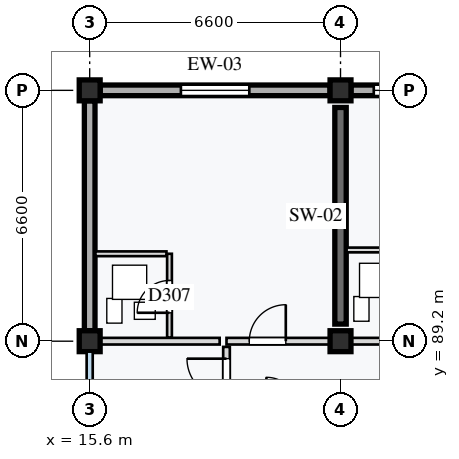
"""IFC4 building model, lengths in metres.
Left out: names, types, materials, properties, quantities, classifications, styles, units other than length and angle.
Written with IfcOpenShell. Run it as: python <this file> out.ifc"""

import sys

from ifc_helpers import new_model, si_unit, direction, frame, frame_2d, origin, origin_2d, place, context, subcontext, project, spatial, rectangle, extrude, element, fill, save


model = new_model("IFC4")
c1 = context("Model", 3, precision=1e-05, world=origin(), true_north=direction((0.0, 1.0)))
c2 = subcontext(c1, "Body", "Model", "MODEL_VIEW")
j1 = project(units=[si_unit("LENGTHUNIT", "METRE"), si_unit("PLANEANGLEUNIT", "RADIAN")], contexts=[c1])
p1 = place(None, origin())
s1 = spatial("IfcSite", under=j1, at=p1, CompositionType="ELEMENT")
p2 = place(p1, origin())
s2 = spatial("IfcBuilding", under=s1, at=p2, CompositionType="ELEMENT")
p3 = place(p2, frame((0.0, 0.0, 30.8)))
s3 = spatial("IfcBuildingStorey", under=s2, at=p3, CompositionType="ELEMENT", Elevation=30.8)
for number, where, z_axis, x_axis in (
    (1, (15.6, 89.2, 0.0), (0.0, 0.0, 1.0), (1.0, 0.0, 0.0)),
    (2, (15.6, 95.8, 0.0), (0.0, 0.0, 1.0), (1.0, 0.0, 0.0)),
    (3, (22.2, 89.2, 0.0), (0.0, 0.0, 1.0), (1.0, 0.0, 0.0)),
    (4, (22.2, 95.8, 0.0), (0.0, 0.0, 1.0), (1.0, 0.0, 0.0)),
):
    element("IfcColumn", number, at=place(p3, frame(where, z_axis=z_axis, x_axis=x_axis)), inside=s3, PredefinedType="COLUMN", context=c2, shape_type="SweptSolid", body=[
        extrude(rectangle(XDim=0.55, YDim=0.55, at=origin_2d()), origin(), (0.0, 0.0, 1.0), 3.2),
    ])
p4 = place(p3, frame((22.2, 89.65, 0.0), z_axis=(0.0, 0.0, 1.0), x_axis=(0.0, 1.0, 0.0)))
e5 = element("IfcWall", 5, at=p4, inside=s3, PredefinedType="SHEAR", context=c2, shape_type="SweptSolid", body=[
    extrude(rectangle(XDim=5.7, YDim=0.3, at=frame_2d((2.85, 0.0))), origin(), (0.0, 0.0, 1.0), 2.97),
])
p5 = place(p3, frame((15.875, 95.8, 0.0), z_axis=(0.0, 0.0, 1.0), x_axis=(1.0, 0.0, 0.0)))
e6 = element("IfcWall", 6, at=p5, inside=s3, PredefinedType="STANDARD", context=c2, shape_type="SweptSolid", body=[
    extrude(rectangle(XDim=6.05, YDim=0.28, at=frame_2d((3.025, 0.0))), origin(), (0.0, 0.0, 1.0), 2.6),
])
p6 = place(p5, frame((2.125, 0.0, 0.85)))
e7 = element("IfcOpeningElement", 7, at=p6, cuts=e6, PredefinedType="OPENING", context=c2, shape_type="SweptSolid", body=[
    extrude(rectangle(XDim=1.8, YDim=1.35, at=frame_2d((0.9, 0.675))), frame((0.0, 0.15, 0.0), z_axis=(0.0, -1.0, 0.0), x_axis=(1.0, 0.0, 0.0)), (0.0, 0.0, 1.0), 0.3),
])
p7 = place(p3, frame((22.475, 95.8, 0.0), z_axis=(0.0, 0.0, 1.0), x_axis=(1.0, 0.0, 0.0)))
e8 = element("IfcWall", 8, at=p7, inside=s3, PredefinedType="STANDARD", context=c2, shape_type="SweptSolid", body=[
    extrude(rectangle(XDim=6.05, YDim=0.28, at=frame_2d((3.025, 0.0))), origin(), (0.0, 0.0, 1.0), 2.6),
])
p8 = place(p7, frame((0.6, 0.0, 0.85)))
e9 = element("IfcOpeningElement", 9, at=p8, cuts=e8, PredefinedType="OPENING", context=c2, shape_type="SweptSolid", body=[
    extrude(rectangle(XDim=1.8, YDim=1.35, at=frame_2d((0.9, 0.675))), frame((0.0, 0.15, 0.0), z_axis=(0.0, -1.0, 0.0), x_axis=(1.0, 0.0, 0.0)), (0.0, 0.0, 1.0), 0.3),
])
p9 = place(p7, frame((4.025, 0.0, 0.85)))
e10 = element("IfcOpeningElement", 10, at=p9, cuts=e8, PredefinedType="OPENING", context=c2, shape_type="SweptSolid", body=[
    extrude(rectangle(XDim=1.5, YDim=1.35, at=frame_2d((0.75, 0.675))), frame((0.0, 0.15, 0.0), z_axis=(0.0, -1.0, 0.0), x_axis=(1.0, 0.0, 0.0)), (0.0, 0.0, 1.0), 0.3),
])
p10 = place(p3, frame((15.6, 89.475, 0.0), z_axis=(0.0, 0.0, 1.0), x_axis=(0.0, 1.0, 0.0)))
e11 = element("IfcWall", 11, at=p10, inside=s3, PredefinedType="STANDARD", context=c2, shape_type="SweptSolid", body=[
    extrude(rectangle(XDim=6.05, YDim=0.28, at=frame_2d((3.025, 0.0))), origin(), (0.0, 0.0, 1.0), 2.65),
])
p11 = place(p3, frame((19.2, 86.05, 0.0), z_axis=(0.0, 0.0, 1.0), x_axis=(0.0, 1.0, 0.0)))
e12 = element("IfcWall", 12, at=p11, inside=s3, PredefinedType="PARTITIONING", context=c2, shape_type="SweptSolid", body=[
    extrude(rectangle(XDim=3.0, YDim=0.175, at=frame_2d((1.5, 0.0))), origin(), (0.0, 0.0, 1.0), 2.97),
])
p12 = place(p11, frame((1.65, 0.0, 0.0)))
e13 = element("IfcOpeningElement", 13, at=p12, cuts=e12, PredefinedType="OPENING", context=c2, shape_type="SweptSolid", body=[
    extrude(rectangle(XDim=1.04, YDim=2.12, at=frame_2d((0.52, 1.06))), frame((0.0, 0.097, 0.0), z_axis=(0.0, -1.0, 0.0), x_axis=(1.0, 0.0, 0.0)), (0.0, 0.0, 1.0), 0.195),
])
p13 = place(p3, frame((15.88, 89.2, 0.0), z_axis=(0.0, 0.0, 1.0), x_axis=(1.0, 0.0, 0.0)))
e14 = element("IfcWall", 14, at=p13, inside=s3, PredefinedType="PARTITIONING", context=c2, shape_type="SweptSolid", body=[
    extrude(rectangle(XDim=3.14, YDim=0.175, at=frame_2d((1.57, 0.0))), origin(), (0.0, 0.0, 1.0), 2.55),
])
p14 = place(p3, frame((19.2, 89.2, 0.0), z_axis=(0.0, 0.0, 1.0), x_axis=(1.0, 0.0, 0.0)))
e15 = element("IfcWall", 15, at=p14, inside=s3, PredefinedType="PARTITIONING", context=c2, shape_type="SweptSolid", body=[
    extrude(rectangle(XDim=3.0, YDim=0.175, at=frame_2d((1.5, 0.0))), origin(), (0.0, 0.0, 1.0), 2.55),
])
p15 = place(p14, frame((0.6, 0.0, 0.0)))
e16 = element("IfcOpeningElement", 16, at=p15, cuts=e15, PredefinedType="OPENING", context=c2, shape_type="SweptSolid", body=[
    extrude(rectangle(XDim=0.96, YDim=2.18, at=frame_2d((0.48, 1.09))), frame((0.0, 0.097, 0.0), z_axis=(0.0, -1.0, 0.0), x_axis=(1.0, 0.0, 0.0)), (0.0, 0.0, 1.0), 0.195),
])
p16 = place(p3, frame((17.7, 89.298, 0.0), z_axis=(0.0, 0.0, 1.0), x_axis=(0.0, 1.0, 0.0)))
e17 = element("IfcWall", 17, at=p16, inside=s3, PredefinedType="PARTITIONING", context=c2, shape_type="SweptSolid", body=[
    extrude(rectangle(XDim=2.202, YDim=0.125, at=frame_2d((1.101, 0.0))), origin(), (0.0, 0.0, 1.0), 2.97),
])
p17 = place(p16, frame((0.65, 0.0, 0.0)))
e18 = element("IfcOpeningElement", 18, at=p17, cuts=e17, PredefinedType="OPENING", context=c2, shape_type="SweptSolid", body=[
    extrude(rectangle(XDim=0.85, YDim=2.04, at=frame_2d((0.425, 1.02))), frame((0.0, 0.073, 0.0), z_axis=(0.0, -1.0, 0.0), x_axis=(1.0, 0.0, 0.0)), (0.0, 0.0, 1.0), 0.145),
])
p18 = place(p3, frame((15.75, 91.5, 0.0), z_axis=(0.0, 0.0, 1.0), x_axis=(1.0, 0.0, 0.0)))
e19 = element("IfcWall", 19, at=p18, inside=s3, PredefinedType="PARTITIONING", context=c2, shape_type="SweptSolid", body=[
    extrude(rectangle(XDim=1.87, YDim=0.125, at=frame_2d((0.935, 0.0))), origin(), (0.0, 0.0, 1.0), 2.97),
])
p19 = place(p3, frame((22.2, 89.2, 0.0), z_axis=(0.0, 0.0, 1.0), x_axis=(1.0, 0.0, 0.0)))
e20 = element("IfcWall", 20, at=p19, inside=s3, PredefinedType="PARTITIONING", context=c2, shape_type="SweptSolid", body=[
    extrude(rectangle(XDim=6.6, YDim=0.175, at=frame_2d((3.3, 0.0))), origin(), (0.0, 0.0, 1.0), 2.55),
])
p20 = place(p19, frame((3.85, 0.0, 0.0)))
e21 = element("IfcOpeningElement", 21, at=p20, cuts=e20, PredefinedType="OPENING", context=c2, shape_type="SweptSolid", body=[
    extrude(rectangle(XDim=0.95, YDim=2.16, at=frame_2d((0.475, 1.08))), frame((0.0, 0.097, 0.0), z_axis=(0.0, -1.0, 0.0), x_axis=(1.0, 0.0, 0.0)), (0.0, 0.0, 1.0), 0.195),
])
p21 = place(p3, frame((22.36, 91.6, 0.0), z_axis=(0.0, 0.0, 1.0), x_axis=(1.0, 0.0, 0.0)))
e22 = element("IfcWall", 22, at=p21, inside=s3, PredefinedType="PARTITIONING", context=c2, shape_type="SweptSolid", body=[
    extrude(rectangle(XDim=1.66, YDim=0.125, at=frame_2d((0.83, 0.0))), origin(), (0.0, 0.0, 1.0), 2.97),
])
p22 = place(p6, origin())
e23 = element("IfcWindow", 23, at=p22, inside=s3, PartitioningType="SINGLE_PANEL", PredefinedType="WINDOW", context=c2, shape_type="SweptSolid", body=[
    extrude(rectangle(XDim=1.8, YDim=1.35, at=frame_2d((0.9, 0.675))), frame((0.0, 0.03, 0.0), z_axis=(0.0, -1.0, 0.0), x_axis=(1.0, 0.0, 0.0)), (0.0, 0.0, 1.0), 0.06),
])
fill(e7, e23)
p23 = place(p8, origin())
e24 = element("IfcWindow", 24, at=p23, inside=s3, PartitioningType="SINGLE_PANEL", PredefinedType="WINDOW", context=c2, shape_type="SweptSolid", body=[
    extrude(rectangle(XDim=1.8, YDim=1.35, at=frame_2d((0.9, 0.675))), frame((0.0, 0.03, 0.0), z_axis=(0.0, -1.0, 0.0), x_axis=(1.0, 0.0, 0.0)), (0.0, 0.0, 1.0), 0.06),
])
fill(e9, e24)
p24 = place(p12, origin())
e25 = element("IfcDoor", 25, at=p24, inside=s3, OperationType="SINGLE_SWING_RIGHT", PredefinedType="DOOR", context=c2, shape_type="SweptSolid", body=[
    extrude(rectangle(XDim=1.04, YDim=2.12, at=frame_2d((0.52, 1.06))), frame((0.0, 0.025, 0.0), z_axis=(0.0, -1.0, 0.0), x_axis=(1.0, 0.0, 0.0)), (0.0, 0.0, 1.0), 0.05),
])
fill(e13, e25)
p25 = place(p15, origin())
e26 = element("IfcDoor", 26, at=p25, inside=s3, OperationType="SINGLE_SWING_RIGHT", PredefinedType="DOOR", context=c2, shape_type="SweptSolid", body=[
    extrude(rectangle(XDim=0.96, YDim=2.18, at=frame_2d((0.48, 1.09))), frame((0.0, 0.025, 0.0), z_axis=(0.0, -1.0, 0.0), x_axis=(1.0, 0.0, 0.0)), (0.0, 0.0, 1.0), 0.05),
])
fill(e16, e26)
p26 = place(p17, origin())
e27 = element("IfcDoor", 27, at=p26, inside=s3, OperationType="SINGLE_SWING_LEFT", PredefinedType="DOOR", context=c2, shape_type="SweptSolid", body=[
    extrude(rectangle(XDim=0.85, YDim=2.04, at=frame_2d((0.425, 1.02))), frame((0.0, 0.025, 0.0), z_axis=(0.0, -1.0, 0.0), x_axis=(1.0, 0.0, 0.0)), (0.0, 0.0, 1.0), 0.05),
])
fill(e18, e27)
save(model, sys.argv[1])
